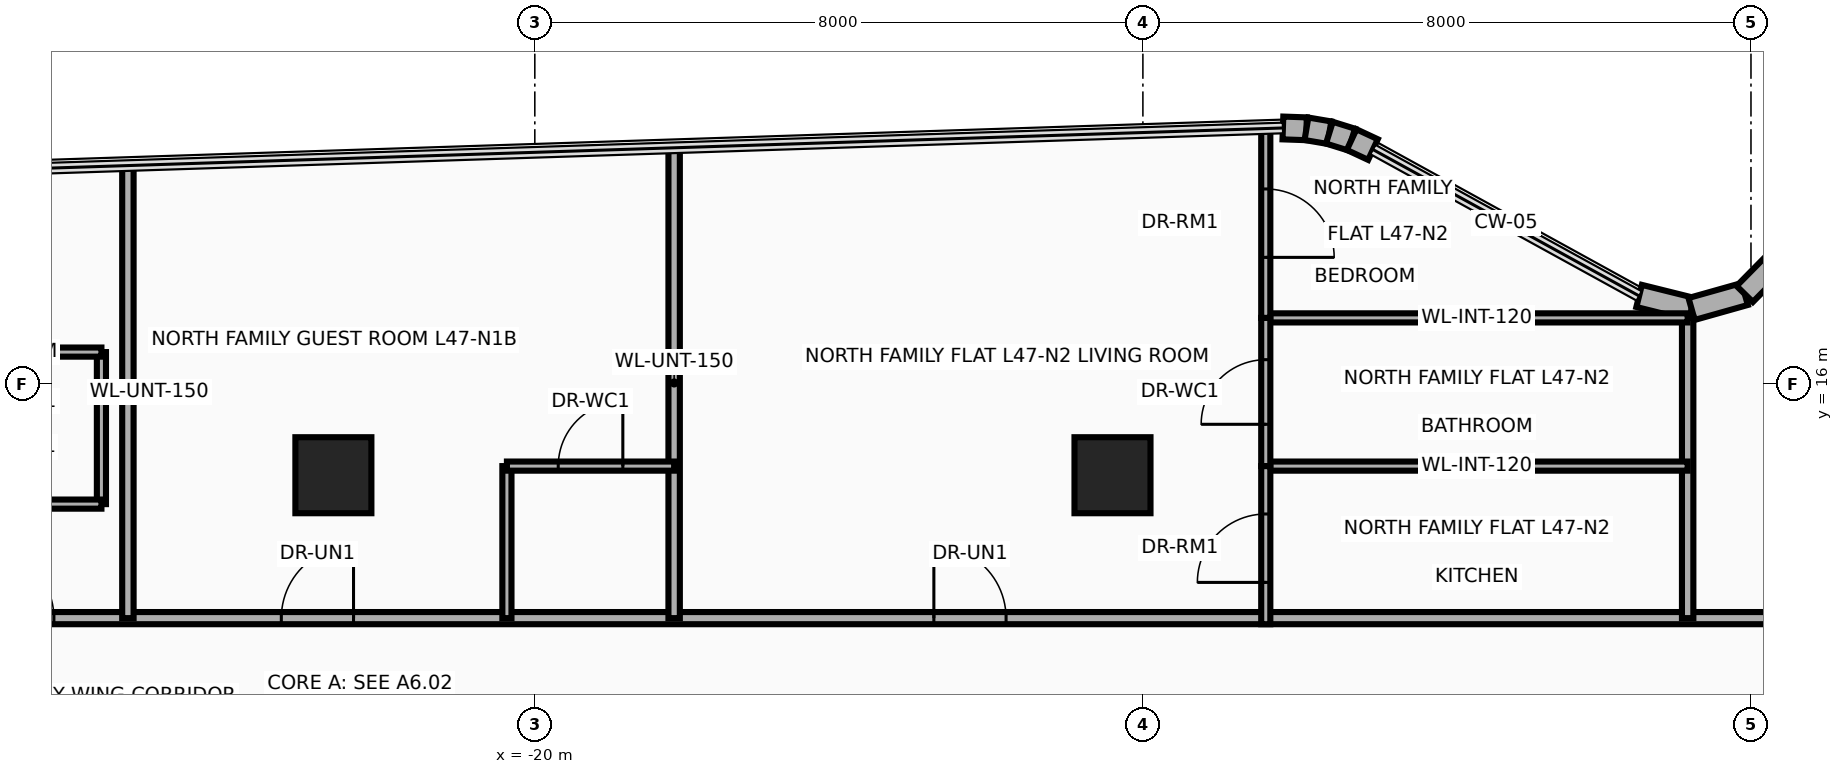
"""IFC4 building model, lengths in metres.
Left out: names, types, materials, properties, quantities, classifications, styles, units other than length and angle.
Written with IfcOpenShell. Run it as: python <this file> out.ifc"""

import sys

from ifc_helpers import new_model, si_unit, direction, frame, frame_2d, origin, origin_2d, place, context, subcontext, project, spatial, rectangle, extrude, source, transform, mapped, element, fill, save


model = new_model("IFC4")
c1 = context("Model", 3, precision=1e-05, world=origin(), true_north=direction((0.0, 1.0)))
c2 = subcontext(c1, "Body", "Model", "MODEL_VIEW")
j1 = project(units=[si_unit("LENGTHUNIT", "METRE"), si_unit("PLANEANGLEUNIT", "RADIAN")], contexts=[c1])
p1 = place(None, origin())
s1 = spatial("IfcSite", under=j1, at=p1, CompositionType="ELEMENT")
p2 = place(p1, origin())
s2 = spatial("IfcBuilding", under=s1, at=p2, CompositionType="ELEMENT")
p3 = place(p2, frame((0.0, 0.0, 184.45)))
s3 = spatial("IfcBuildingStorey", under=s2, at=p3, CompositionType="ELEMENT", Elevation=184.45)
m1 = source(origin(), c2, "Body", "SweptSolid", [
    extrude(rectangle(XDim=1.0, YDim=1.0, at=origin_2d()), origin(), (0.0, 0.0, 1.0), 3.95),
])
for number, where, z_axis, x_axis in (
    (1, (-22.65, 14.8, 0.0), (0.0, 0.0, 1.0), (1.0, 0.0, 0.0)),
    (2, (-12.4, 14.8, 0.0), (0.0, 0.0, 1.0), (1.0, 0.0, 0.0)),
):
    element("IfcColumn", number, at=place(p3, frame(where, z_axis=z_axis, x_axis=x_axis)), inside=s3, PredefinedType="COLUMN", context=c2, shape_type="MappedRepresentation", body=[
        mapped(m1, transform((0.0, 0.0, 0.0), x_axis=(1.0, 0.0, 0.0), y_axis=(0.0, 1.0, 0.0), z_axis=(0.0, 0.0, 1.0), scale=1.0)),
    ])
p4 = place(p3, frame((-10.158, 19.368, 0.0), z_axis=(0.0, 0.0, 1.0), x_axis=(0.999425494718, -0.03389218949, 0.0)))
e3 = element("IfcWall", 3, at=p4, inside=s3, PredefinedType="SOLIDWALL", context=c2, shape_type="SweptSolid", body=[
    extrude(rectangle(XDim=0.31, YDim=0.3, at=frame_2d((0.155, 0.0))), origin(), (0.0, 0.0, 1.0), 3.63),
])
for number, where, z_axis, x_axis in (
    (4, (-9.848, 19.358, 0.0), (0.0, 0.0, 1.0), (0.986, -0.167, 0.0)),
    (5, (-9.546, 19.307, 0.0), (0.0, 0.0, 1.0), (0.955, -0.297, 0.0)),
):
    element("IfcWall", number, at=place(p3, frame(where, z_axis=z_axis, x_axis=x_axis)), inside=s3, PredefinedType="SOLIDWALL", context=c2, shape_type="SweptSolid", body=[
        extrude(rectangle(XDim=0.306, YDim=0.3, at=frame_2d((0.153, 0.0))), origin(), (0.0, 0.0, 1.0), 3.63),
    ])
p5 = place(p3, frame((-9.254, 19.216, 0.0), z_axis=(0.0, 0.0, 1.0), x_axis=(0.906524902388, -0.42215234377, 0.0)))
e6 = element("IfcWall", 6, at=p5, inside=s3, PredefinedType="SOLIDWALL", context=c2, shape_type="SweptSolid", body=[
    extrude(rectangle(XDim=0.31, YDim=0.3, at=frame_2d((0.155, 0.0))), origin(), (0.0, 0.0, 1.0), 3.63),
])
p6 = place(p3, frame((-5.472, 17.159, 0.0), z_axis=(0.0, 0.0, 1.0), x_axis=(0.970564820059, -0.240840050789, 0.0)))
e7 = element("IfcWall", 7, at=p6, inside=s3, PredefinedType="SOLIDWALL", context=c2, shape_type="SweptSolid", body=[
    extrude(rectangle(XDim=0.712, YDim=0.3, at=frame_2d((0.356, 0.0))), origin(), (0.0, 0.0, 1.0), 3.63),
])
p7 = place(p3, frame((-4.781, 16.987, 0.0), z_axis=(0.0, 0.0, 1.0), x_axis=(0.962494705656, 0.271300463662, 0.0)))
e8 = element("IfcWall", 8, at=p7, inside=s3, PredefinedType="SOLIDWALL", context=c2, shape_type="SweptSolid", body=[
    extrude(rectangle(XDim=0.726, YDim=0.3, at=frame_2d((0.363, 0.0))), origin(), (0.0, 0.0, 1.0), 3.63),
])
p8 = place(p3, frame((-4.082, 17.184, 0.0), z_axis=(0.0, 0.0, 1.0), x_axis=(0.701538604215, 0.712631452293, 0.0)))
e9 = element("IfcWall", 9, at=p8, inside=s3, PredefinedType="SOLIDWALL", context=c2, shape_type="SweptSolid", body=[
    extrude(rectangle(XDim=0.726, YDim=0.3, at=frame_2d((0.363, 0.0))), origin(), (0.0, 0.0, 1.0), 2.615),
])
p9 = place(p3, frame((-28.25, 12.92, 0.0), z_axis=(0.0, 0.0, 1.0), x_axis=(1.0, 0.0, 0.0)))
e10 = element("IfcWall", 10, at=p9, inside=s3, PredefinedType="PARTITIONING", context=c2, shape_type="SweptSolid", body=[
    extrude(rectangle(XDim=36.75, YDim=0.16, at=frame_2d((18.375, 0.0))), origin(), (0.0, 0.0, 1.0), 2.615),
])
p10 = place(p9, frame((0.973, 0.0, 0.0)))
e11 = element("IfcOpeningElement", 11, at=p10, cuts=e10, PredefinedType="OPENING", context=c2, shape_type="SweptSolid", body=[
    extrude(rectangle(XDim=0.95, YDim=2.15, at=frame_2d((0.475, 1.075))), frame((0.0, 0.095, 0.0), z_axis=(0.0, -1.0, 0.0), x_axis=(1.0, 0.0, 0.0)), (0.0, 0.0, 1.0), 0.19),
])
p11 = place(p9, frame((4.915, 0.0, 0.0)))
e12 = element("IfcOpeningElement", 12, at=p11, cuts=e10, PredefinedType="OPENING", context=c2, shape_type="SweptSolid", body=[
    extrude(rectangle(XDim=0.95, YDim=2.15, at=frame_2d((0.475, 1.075))), frame((0.0, 0.095, 0.0), z_axis=(0.0, -1.0, 0.0), x_axis=(1.0, 0.0, 0.0)), (0.0, 0.0, 1.0), 0.19),
])
p12 = place(p9, frame((13.5, 0.0, 0.0)))
e13 = element("IfcOpeningElement", 13, at=p12, cuts=e10, PredefinedType="OPENING", context=c2, shape_type="SweptSolid", body=[
    extrude(rectangle(XDim=0.95, YDim=2.15, at=frame_2d((0.475, 1.075))), frame((0.0, 0.095, 0.0), z_axis=(0.0, -1.0, 0.0), x_axis=(1.0, 0.0, 0.0)), (0.0, 0.0, 1.0), 0.19),
])
p13 = place(p9, frame((26.834, 0.0, 0.0)))
e14 = element("IfcOpeningElement", 14, at=p13, cuts=e10, PredefinedType="OPENING", context=c2, shape_type="SweptSolid", body=[
    extrude(rectangle(XDim=0.95, YDim=2.15, at=frame_2d((0.475, 1.075))), frame((0.0, 0.095, 0.0), z_axis=(0.0, -1.0, 0.0), x_axis=(1.0, 0.0, 0.0)), (0.0, 0.0, 1.0), 0.19),
])
p14 = place(p3, frame((-18.167, 12.92, 0.0), z_axis=(0.0, 0.0, 1.0), x_axis=(0.0, 1.0, 0.0)))
e15 = element("IfcWall", 15, at=p14, inside=s3, PredefinedType="PARTITIONING", context=c2, shape_type="SweptSolid", body=[
    extrude(rectangle(XDim=6.188, YDim=0.15, at=frame_2d((3.094, 0.0))), origin(), (0.0, 0.0, 1.0), 2.665),
])
p15 = place(p3, frame((-4.833, 12.92, 0.0), z_axis=(0.0, 0.0, 1.0), x_axis=(0.0, 1.0, 0.0)))
e16 = element("IfcWall", 16, at=p15, inside=s3, PredefinedType="PARTITIONING", context=c2, shape_type="SweptSolid", body=[
    extrude(rectangle(XDim=3.951, YDim=0.15, at=frame_2d((1.976, 0.0))), origin(), (0.0, 0.0, 1.0), 2.415),
])
p16 = place(p3, frame((-25.354, 12.92, 0.0), z_axis=(0.0, 0.0, 1.0), x_axis=(0.0, 1.0, 0.0)))
e17 = element("IfcWall", 17, at=p16, inside=s3, PredefinedType="PARTITIONING", context=c2, shape_type="SweptSolid", body=[
    extrude(rectangle(XDim=5.954, YDim=0.15, at=frame_2d((2.977, 0.0))), origin(), (0.0, 0.0, 1.0), 2.665),
])
p17 = place(p3, frame((-25.702, 14.42, 0.0), z_axis=(0.0, 0.0, 1.0), x_axis=(0.0, 1.0, 0.0)))
e18 = element("IfcWall", 18, at=p17, inside=s3, PredefinedType="PARTITIONING", context=c2, shape_type="SweptSolid", body=[
    extrude(rectangle(XDim=2.0, YDim=0.12, at=frame_2d((1.0, 0.0))), origin(), (0.0, 0.0, 1.0), 2.665),
])
p18 = place(p3, frame((-27.902, 16.42, 0.0), z_axis=(0.0, 0.0, 1.0), x_axis=(1.0, 0.0, 0.0)))
e19 = element("IfcWall", 19, at=p18, inside=s3, PredefinedType="PARTITIONING", context=c2, shape_type="SweptSolid", body=[
    extrude(rectangle(XDim=2.2, YDim=0.12, at=frame_2d((1.1, 0.0))), origin(), (0.0, 0.0, 1.0), 3.63),
])
p19 = place(p3, frame((-27.902, 14.42, 0.0), z_axis=(0.0, 0.0, 1.0), x_axis=(1.0, 0.0, 0.0)))
e20 = element("IfcWall", 20, at=p19, inside=s3, PredefinedType="PARTITIONING", context=c2, shape_type="SweptSolid", body=[
    extrude(rectangle(XDim=2.2, YDim=0.12, at=frame_2d((1.1, 0.0))), origin(), (0.0, 0.0, 1.0), 3.63),
])
p20 = place(p19, frame((0.675, 0.0, 0.0)))
e21 = element("IfcOpeningElement", 21, at=p20, cuts=e20, PredefinedType="OPENING", context=c2, shape_type="SweptSolid", body=[
    extrude(rectangle(XDim=0.85, YDim=2.1, at=frame_2d((0.425, 1.05))), frame((0.0, 0.075, 0.0), z_axis=(0.0, -1.0, 0.0), x_axis=(1.0, 0.0, 0.0)), (0.0, 0.0, 1.0), 0.15),
])
p21 = place(p3, frame((-20.367, 12.92, 0.0), z_axis=(0.0, 0.0, 1.0), x_axis=(0.0, 1.0, 0.0)))
e22 = element("IfcWall", 22, at=p21, inside=s3, PredefinedType="PARTITIONING", context=c2, shape_type="SweptSolid", body=[
    extrude(rectangle(XDim=2.0, YDim=0.12, at=frame_2d((1.0, 0.0))), origin(), (0.0, 0.0, 1.0), 2.665),
])
p22 = place(p3, frame((-20.367, 14.92, 0.0), z_axis=(0.0, 0.0, 1.0), x_axis=(1.0, 0.0, 0.0)))
e23 = element("IfcWall", 23, at=p22, inside=s3, PredefinedType="PARTITIONING", context=c2, shape_type="SweptSolid", body=[
    extrude(rectangle(XDim=2.2, YDim=0.12, at=frame_2d((1.1, 0.0))), origin(), (0.0, 0.0, 1.0), 2.665),
])
p23 = place(p22, frame((0.675, 0.0, 0.0)))
e24 = element("IfcOpeningElement", 24, at=p23, cuts=e23, PredefinedType="OPENING", context=c2, shape_type="SweptSolid", body=[
    extrude(rectangle(XDim=0.85, YDim=2.1, at=frame_2d((0.425, 1.05))), frame((0.0, 0.075, 0.0), z_axis=(0.0, -1.0, 0.0), x_axis=(1.0, 0.0, 0.0)), (0.0, 0.0, 1.0), 0.15),
])
p24 = place(p3, frame((-10.383, 14.92, 0.0), z_axis=(0.0, 0.0, 1.0), x_axis=(1.0, 0.0, 0.0)))
e25 = element("IfcWall", 25, at=p24, inside=s3, PredefinedType="PARTITIONING", context=c2, shape_type="SweptSolid", body=[
    extrude(rectangle(XDim=5.55, YDim=0.12, at=frame_2d((2.775, 0.0))), origin(), (0.0, 0.0, 1.0), 2.415),
])
p25 = place(p3, frame((-10.383, 16.87, 0.0), z_axis=(0.0, 0.0, 1.0), x_axis=(1.0, 0.0, 0.0)))
e26 = element("IfcWall", 26, at=p25, inside=s3, PredefinedType="PARTITIONING", context=c2, shape_type="SweptSolid", body=[
    extrude(rectangle(XDim=5.55, YDim=0.12, at=frame_2d((2.775, 0.0))), origin(), (0.0, 0.0, 1.0), 3.63),
])
p26 = place(p3, frame((-10.383, 14.92, 0.0), z_axis=(0.0, 0.0, 1.0), x_axis=(0.0, 1.0, 0.0)))
e27 = element("IfcWall", 27, at=p26, inside=s3, PredefinedType="PARTITIONING", context=c2, shape_type="SweptSolid", body=[
    extrude(rectangle(XDim=1.95, YDim=0.12, at=frame_2d((0.975, 0.0))), origin(), (0.0, 0.0, 1.0), 2.415),
])
p27 = place(p26, frame((0.55, 0.0, 0.0)))
e28 = element("IfcOpeningElement", 28, at=p27, cuts=e27, PredefinedType="OPENING", context=c2, shape_type="SweptSolid", body=[
    extrude(rectangle(XDim=0.85, YDim=2.1, at=frame_2d((0.425, 1.05))), frame((0.0, 0.075, 0.0), z_axis=(0.0, -1.0, 0.0), x_axis=(1.0, 0.0, 0.0)), (0.0, 0.0, 1.0), 0.15),
])
p28 = place(p3, frame((-10.383, 12.84, 0.0), z_axis=(0.0, 0.0, 1.0), x_axis=(0.0, 1.0, 0.0)))
e29 = element("IfcWall", 29, at=p28, inside=s3, PredefinedType="PARTITIONING", context=c2, shape_type="SweptSolid", body=[
    extrude(rectangle(XDim=2.08, YDim=0.12, at=frame_2d((1.04, 0.0))), origin(), (0.0, 0.0, 1.0), 2.415),
])
p29 = place(p28, frame((0.55, 0.0, 0.0)))
e30 = element("IfcOpeningElement", 30, at=p29, cuts=e29, PredefinedType="OPENING", context=c2, shape_type="SweptSolid", body=[
    extrude(rectangle(XDim=0.9, YDim=2.1, at=frame_2d((0.45, 1.05))), frame((0.0, 0.075, 0.0), z_axis=(0.0, -1.0, 0.0), x_axis=(1.0, 0.0, 0.0)), (0.0, 0.0, 1.0), 0.15),
])
p30 = place(p3, frame((-10.383, 16.87, 0.0), z_axis=(0.0, 0.0, 1.0), x_axis=(0.0, 1.0, 0.0)))
e31 = element("IfcWall", 31, at=p30, inside=s3, PredefinedType="PARTITIONING", context=c2, shape_type="SweptSolid", body=[
    extrude(rectangle(XDim=2.491, YDim=0.12, at=frame_2d((1.246, 0.0))), origin(), (0.0, 0.0, 1.0), 3.63),
])
p31 = place(p30, frame((0.796, 0.0, 0.0)))
e32 = element("IfcOpeningElement", 32, at=p31, cuts=e31, PredefinedType="OPENING", context=c2, shape_type="SweptSolid", body=[
    extrude(rectangle(XDim=0.9, YDim=2.1, at=frame_2d((0.45, 1.05))), frame((0.0, 0.075, 0.0), z_axis=(0.0, -1.0, 0.0), x_axis=(1.0, 0.0, 0.0)), (0.0, 0.0, 1.0), 0.15),
])
p32 = place(p10, origin())
e33 = element("IfcDoor", 33, at=p32, inside=s3, OperationType="SINGLE_SWING_RIGHT", PredefinedType="DOOR", context=c2, shape_type="SweptSolid", body=[
    extrude(rectangle(XDim=0.95, YDim=2.15, at=frame_2d((0.475, 1.075))), frame((0.0, 0.025, 0.0), z_axis=(0.0, -1.0, 0.0), x_axis=(1.0, 0.0, 0.0)), (0.0, 0.0, 1.0), 0.05),
])
fill(e11, e33)
p33 = place(p11, origin())
e34 = element("IfcDoor", 34, at=p33, inside=s3, OperationType="SINGLE_SWING_RIGHT", PredefinedType="DOOR", context=c2, shape_type="SweptSolid", body=[
    extrude(rectangle(XDim=0.95, YDim=2.15, at=frame_2d((0.475, 1.075))), frame((0.0, 0.025, 0.0), z_axis=(0.0, -1.0, 0.0), x_axis=(1.0, 0.0, 0.0)), (0.0, 0.0, 1.0), 0.05),
])
fill(e12, e34)
p34 = place(p23, origin())
e35 = element("IfcDoor", 35, at=p34, inside=s3, OperationType="SINGLE_SWING_LEFT", PredefinedType="DOOR", context=c2, shape_type="SweptSolid", body=[
    extrude(rectangle(XDim=0.85, YDim=2.1, at=frame_2d((0.425, 1.05))), frame((0.0, 0.025, 0.0), z_axis=(0.0, -1.0, 0.0), x_axis=(1.0, 0.0, 0.0)), (0.0, 0.0, 1.0), 0.05),
])
fill(e24, e35)
p35 = place(p12, origin())
e36 = element("IfcDoor", 36, at=p35, inside=s3, OperationType="SINGLE_SWING_RIGHT", PredefinedType="DOOR", context=c2, shape_type="SweptSolid", body=[
    extrude(rectangle(XDim=0.95, YDim=2.15, at=frame_2d((0.475, 1.075))), frame((0.0, 0.025, 0.0), z_axis=(0.0, -1.0, 0.0), x_axis=(1.0, 0.0, 0.0)), (0.0, 0.0, 1.0), 0.05),
])
fill(e13, e36)
p36 = place(p27, origin())
e37 = element("IfcDoor", 37, at=p36, inside=s3, OperationType="SINGLE_SWING_LEFT", PredefinedType="DOOR", context=c2, shape_type="SweptSolid", body=[
    extrude(rectangle(XDim=0.85, YDim=2.1, at=frame_2d((0.425, 1.05))), frame((0.0, 0.025, 0.0), z_axis=(0.0, -1.0, 0.0), x_axis=(1.0, 0.0, 0.0)), (0.0, 0.0, 1.0), 0.05),
])
fill(e28, e37)
p37 = place(p29, origin())
e38 = element("IfcDoor", 38, at=p37, inside=s3, OperationType="SINGLE_SWING_RIGHT", PredefinedType="DOOR", context=c2, shape_type="SweptSolid", body=[
    extrude(rectangle(XDim=0.9, YDim=2.1, at=frame_2d((0.45, 1.05))), frame((0.0, 0.025, 0.0), z_axis=(0.0, -1.0, 0.0), x_axis=(1.0, 0.0, 0.0)), (0.0, 0.0, 1.0), 0.05),
])
fill(e30, e38)
p38 = place(p31, frame((0.9, 0.0, 0.0), z_axis=(0.0, 0.0, 1.0), x_axis=(-1.0, 0.0, 0.0)))
e39 = element("IfcDoor", 39, at=p38, inside=s3, OperationType="SINGLE_SWING_LEFT", PredefinedType="DOOR", context=c2, shape_type="SweptSolid", body=[
    extrude(rectangle(XDim=0.9, YDim=2.1, at=frame_2d((0.45, 1.05))), frame((0.0, 0.025, 0.0), z_axis=(0.0, -1.0, 0.0), x_axis=(1.0, 0.0, 0.0)), (0.0, 0.0, 1.0), 0.05),
])
fill(e32, e39)
save(model, sys.argv[1])
